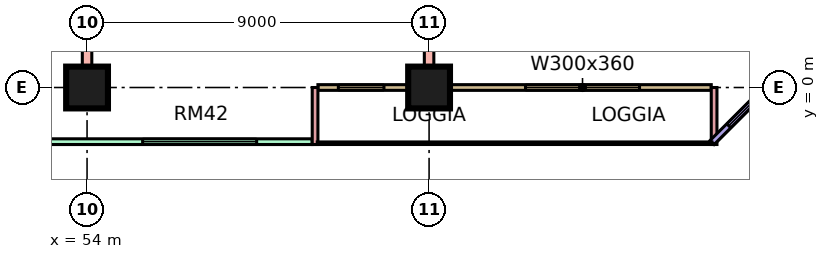
"""IFC4 building model, lengths in metres.
Left out: names, types, materials, properties, quantities, classifications, styles, units other than length and angle.
Written with IfcOpenShell. Run it as: python <this file> out.ifc"""

import sys

from ifc_helpers import new_model, si_unit, direction, frame, frame_2d, origin, origin_2d, place, context, subcontext, project, spatial, rectangle, extrude, element, fill, save


model = new_model("IFC4")
c1 = context("Model", 3, precision=1e-05, world=origin(), true_north=direction((0.0, 1.0)))
c2 = subcontext(c1, "Body", "Model", "MODEL_VIEW")
j1 = project(units=[si_unit("LENGTHUNIT", "METRE"), si_unit("PLANEANGLEUNIT", "RADIAN")], contexts=[c1])
p1 = place(None, origin())
s1 = spatial("IfcSite", under=j1, at=p1, CompositionType="ELEMENT")
p2 = place(p1, origin())
s2 = spatial("IfcBuilding", under=s1, at=p2, CompositionType="ELEMENT")
p3 = place(p2, frame((0.0, 0.0, 86.4)))
s3 = spatial("IfcBuildingStorey", under=s2, at=p3, CompositionType="ELEMENT", Elevation=86.4)
for number, where, z_axis, x_axis in (
    (1, (54.0, 0.0, 0.0), (0.0, 0.0, 1.0), (1.0, 0.0, 0.0)),
    (2, (63.0, 0.0, 0.0), (0.0, 0.0, 1.0), (1.0, 0.0, 0.0)),
):
    element("IfcColumn", number, at=place(p3, frame(where, z_axis=z_axis, x_axis=x_axis)), inside=s3, PredefinedType="COLUMN", context=c2, shape_type="SweptSolid", body=[
        extrude(rectangle(XDim=1.1, YDim=1.1, at=origin_2d()), origin(), (0.0, 0.0, 1.0), 5.5),
    ])
p4 = place(p3, frame((48.075, -1.425, 0.0), z_axis=(0.0, 0.0, 1.0), x_axis=(1.0, 0.0, 0.0)))
e3 = element("IfcWall", 3, at=p4, inside=s3, PredefinedType="SOLIDWALL", context=c2, shape_type="SweptSolid", body=[
    extrude(rectangle(XDim=11.85, YDim=0.15, at=frame_2d((5.925, 0.0))), origin(), (0.0, 0.0, 1.0), 5.1),
])
p5 = place(p4, frame((1.462, 0.0, 0.45)))
e4 = element("IfcOpeningElement", 4, at=p5, cuts=e3, PredefinedType="OPENING", context=c2, shape_type="SweptSolid", body=[
    extrude(rectangle(XDim=3.0, YDim=3.6, at=frame_2d((1.5, 1.8))), frame((0.0, 0.085, 0.0), z_axis=(0.0, -1.0, 0.0), x_axis=(1.0, 0.0, 0.0)), (0.0, 0.0, 1.0), 0.17),
])
p6 = place(p4, frame((7.387, 0.0, 0.45)))
e5 = element("IfcOpeningElement", 5, at=p6, cuts=e3, PredefinedType="OPENING", context=c2, shape_type="SweptSolid", body=[
    extrude(rectangle(XDim=3.0, YDim=3.6, at=frame_2d((1.5, 1.8))), frame((0.0, 0.085, 0.0), z_axis=(0.0, -1.0, 0.0), x_axis=(1.0, 0.0, 0.0)), (0.0, 0.0, 1.0), 0.17),
])
p7 = place(p3, frame((60.075, 0.0, 0.0), z_axis=(0.0, 0.0, 1.0), x_axis=(1.0, 0.0, 0.0)))
e6 = element("IfcWall", 6, at=p7, inside=s3, PredefinedType="SOLIDWALL", context=c2, shape_type="SweptSolid", body=[
    extrude(rectangle(XDim=10.35, YDim=0.15, at=frame_2d((5.175, 0.0))), origin(), (0.0, 0.0, 1.0), 5.1),
])
p8 = place(p7, frame((0.538, 0.0, 0.45)))
e7 = element("IfcOpeningElement", 7, at=p8, cuts=e6, PredefinedType="OPENING", context=c2, shape_type="SweptSolid", body=[
    extrude(rectangle(XDim=1.2, YDim=3.6, at=frame_2d((0.6, 1.8))), frame((0.0, 0.085, 0.0), z_axis=(0.0, -1.0, 0.0), x_axis=(1.0, 0.0, 0.0)), (0.0, 0.0, 1.0), 0.17),
])
p9 = place(p7, frame((5.462, 0.0, 0.45)))
e8 = element("IfcOpeningElement", 8, at=p9, cuts=e6, PredefinedType="OPENING", context=c2, shape_type="SweptSolid", body=[
    extrude(rectangle(XDim=3.0, YDim=3.6, at=frame_2d((1.5, 1.8))), frame((0.0, 0.085, 0.0), z_axis=(0.0, -1.0, 0.0), x_axis=(1.0, 0.0, 0.0)), (0.0, 0.0, 1.0), 0.17),
])
for number, where, z_axis, x_axis in (
    (9, (60.0, -1.5, 0.0), (0.0, 0.0, 1.0), (0.0, 1.0, 0.0)),
    (10, (70.5, -1.5, 0.0), (0.0, 0.0, 1.0), (0.0, 1.0, 0.0)),
):
    element("IfcWall", number, at=place(p3, frame(where, z_axis=z_axis, x_axis=x_axis)), inside=s3, PredefinedType="SOLIDWALL", context=c2, shape_type="SweptSolid", body=[
        extrude(rectangle(XDim=1.5, YDim=0.15, at=frame_2d((0.75, 0.0))), origin(), (0.0, 0.0, 1.0), 5.1),
    ])
p10 = place(p3, frame((70.447, -1.447, 0.0), z_axis=(0.0, 0.0, 1.0), x_axis=(0.707106781187, 0.707106781187, 0.0)))
e11 = element("IfcWall", 11, at=p10, inside=s3, PredefinedType="SOLIDWALL", context=c2, shape_type="SweptSolid", body=[
    extrude(rectangle(XDim=4.243, YDim=0.15, at=frame_2d((2.121, 0.0))), origin(), (0.0, 0.0, 1.0), 5.1),
])
p11 = place(p10, frame((0.621, 0.0, 0.45)))
e12 = element("IfcOpeningElement", 12, at=p11, cuts=e11, PredefinedType="OPENING", context=c2, shape_type="SweptSolid", body=[
    extrude(rectangle(XDim=3.0, YDim=3.6, at=frame_2d((1.5, 1.8))), frame((0.0, 0.085, 0.0), z_axis=(0.0, -1.0, 0.0), x_axis=(1.0, 0.0, 0.0)), (0.0, 0.0, 1.0), 0.17),
])
p12 = place(p3, frame((54.0, 0.0, 0.0), z_axis=(0.0, 0.0, 1.0), x_axis=(0.0, 1.0, 0.0)))
e13 = element("IfcWall", 13, at=p12, inside=s3, PredefinedType="PARTITIONING", context=c2, shape_type="SweptSolid", body=[
    extrude(rectangle(XDim=11.601, YDim=0.25, at=frame_2d((5.801, 0.0))), origin(), (0.0, 0.0, 1.0), 5.1),
])
p13 = place(p3, frame((63.0, 0.074, 0.0), z_axis=(0.0, 0.0, 1.0), x_axis=(0.0, 1.0, 0.0)))
e14 = element("IfcWall", 14, at=p13, inside=s3, PredefinedType="PARTITIONING", context=c2, shape_type="SweptSolid", body=[
    extrude(rectangle(XDim=11.527, YDim=0.25, at=frame_2d((5.764, 0.0))), origin(), (0.0, 0.0, 1.0), 5.1),
])
p14 = place(p6, origin())
e15 = element("IfcWindow", 15, at=p14, inside=s3, PartitioningType="SINGLE_PANEL", PredefinedType="WINDOW", context=c2, shape_type="SweptSolid", body=[
    extrude(rectangle(XDim=3.0, YDim=3.6, at=frame_2d((1.5, 1.8))), frame((0.0, 0.03, 0.0), z_axis=(0.0, -1.0, 0.0), x_axis=(1.0, 0.0, 0.0)), (0.0, 0.0, 1.0), 0.06),
])
fill(e5, e15)
p15 = place(p8, origin())
e16 = element("IfcWindow", 16, at=p15, inside=s3, PartitioningType="SINGLE_PANEL", PredefinedType="WINDOW", context=c2, shape_type="SweptSolid", body=[
    extrude(rectangle(XDim=1.2, YDim=3.6, at=frame_2d((0.6, 1.8))), frame((0.0, 0.03, 0.0), z_axis=(0.0, -1.0, 0.0), x_axis=(1.0, 0.0, 0.0)), (0.0, 0.0, 1.0), 0.06),
])
fill(e7, e16)
p16 = place(p9, origin())
e17 = element("IfcWindow", 17, at=p16, inside=s3, PartitioningType="SINGLE_PANEL", PredefinedType="WINDOW", context=c2, shape_type="SweptSolid", body=[
    extrude(rectangle(XDim=3.0, YDim=3.6, at=frame_2d((1.5, 1.8))), frame((0.0, 0.03, 0.0), z_axis=(0.0, -1.0, 0.0), x_axis=(1.0, 0.0, 0.0)), (0.0, 0.0, 1.0), 0.06),
])
fill(e8, e17)
p17 = place(p11, origin())
e18 = element("IfcWindow", 18, at=p17, inside=s3, PartitioningType="SINGLE_PANEL", PredefinedType="WINDOW", context=c2, shape_type="SweptSolid", body=[
    extrude(rectangle(XDim=3.0, YDim=3.6, at=frame_2d((1.5, 1.8))), frame((0.0, 0.03, 0.0), z_axis=(0.0, -1.0, 0.0), x_axis=(1.0, 0.0, 0.0)), (0.0, 0.0, 1.0), 0.06),
])
fill(e12, e18)
save(model, sys.argv[1])
